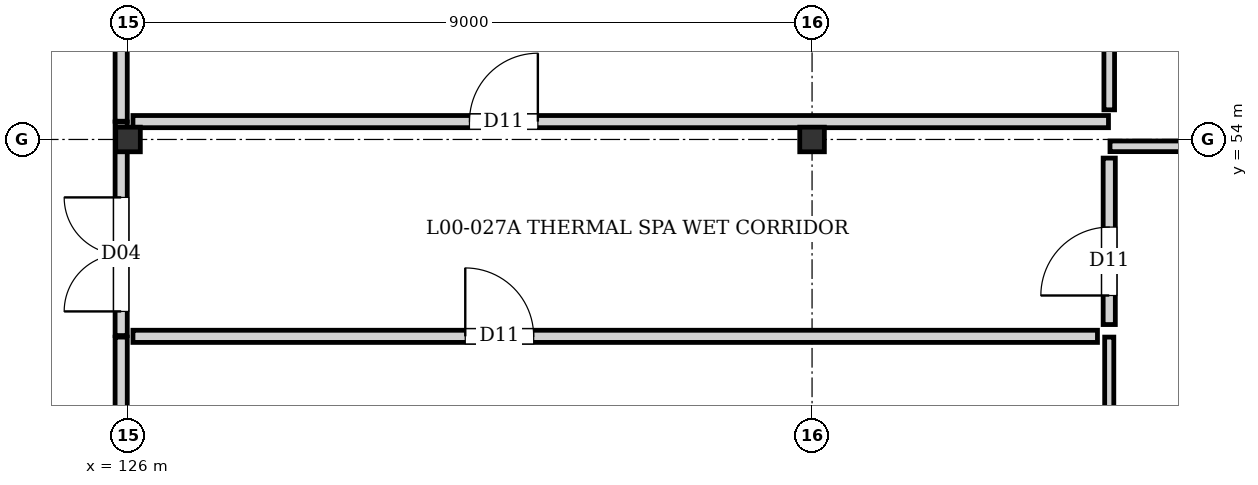
"""IFC4 building model, lengths in metres.
Left out: names, types, materials, properties, quantities, classifications, styles, units other than length and angle.
Written with IfcOpenShell. Run it as: python <this file> out.ifc"""

import sys

from ifc_helpers import new_model, si_unit, direction, frame, frame_2d, origin, origin_2d, place, context, subcontext, project, spatial, rectangle, hollow_circle, extrude, element, fill, save


model = new_model("IFC4")
c1 = context("Model", 3, precision=1e-05, world=origin(), true_north=direction((0.0, 1.0)))
c2 = subcontext(c1, "Body", "Model", "MODEL_VIEW")
j1 = project(units=[si_unit("LENGTHUNIT", "METRE"), si_unit("PLANEANGLEUNIT", "RADIAN")], contexts=[c1])
p1 = place(None, origin())
s1 = spatial("IfcSite", under=j1, at=p1, CompositionType="ELEMENT")
p2 = place(p1, origin())
s2 = spatial("IfcBuilding", under=s1, at=p2, CompositionType="ELEMENT")
p3 = place(p2, origin())
s3 = spatial("IfcBuildingStorey", under=s2, at=p3, CompositionType="ELEMENT", Elevation=0.0)
for number, where, z_axis, x_axis in (
    (1, (126.0, 54.0, 0.0), (0.0, 0.0, 1.0), (1.0, 0.0, 0.0)),
    (2, (135.0, 54.0, 0.0), (0.0, 0.0, 1.0), (1.0, 0.0, 0.0)),
):
    element("IfcColumn", number, at=place(p3, frame(where, z_axis=z_axis, x_axis=x_axis)), inside=s3, PredefinedType="COLUMN", context=c2, shape_type="SweptSolid", body=[
        extrude(hollow_circle(Radius=0.162, WallThickness=0.016, at=origin_2d()), origin(), (0.0, 0.0, 1.0), 4.32),
    ])
p4 = place(p3, frame((125.91, 45.27, 0.0), z_axis=(0.0, 0.0, 1.0), x_axis=(0.0, 1.0, 0.0)))
e3 = element("IfcWall", 3, at=p4, inside=s3, PredefinedType="PARTITIONING", context=c2, shape_type="SweptSolid", body=[
    extrude(rectangle(XDim=6.13, YDim=0.16, at=frame_2d((3.065, 0.0))), origin(), (0.0, 0.0, 1.0), 3.765),
])
p5 = place(p3, frame((125.91, 54.24, 0.0), z_axis=(0.0, 0.0, 1.0), x_axis=(0.0, 1.0, 0.0)))
e4 = element("IfcWall", 4, at=p5, inside=s3, PredefinedType="PARTITIONING", context=c2, shape_type="SweptSolid", body=[
    extrude(rectangle(XDim=3.34, YDim=0.16, at=frame_2d((1.67, 0.0))), origin(), (0.0, 0.0, 1.0), 3.725),
])
p6 = place(p3, frame((138.91, 45.27, 0.0), z_axis=(0.0, 0.0, 1.0), x_axis=(0.0, 1.0, 0.0)))
e5 = element("IfcWall", 5, at=p6, inside=s3, PredefinedType="PARTITIONING", context=c2, shape_type="SweptSolid", body=[
    extrude(rectangle(XDim=6.13, YDim=0.12, at=frame_2d((3.065, 0.0))), origin(), (0.0, 0.0, 1.0), 4.055),
])
p7 = place(p3, frame((138.92, 53.91, 0.0), z_axis=(0.0, 0.0, 1.0), x_axis=(1.0, 0.0, 0.0)))
e6 = element("IfcWall", 6, at=p7, inside=s3, PredefinedType="PLUMBINGWALL", context=c2, shape_type="SweptSolid", body=[
    extrude(rectangle(XDim=4.945, YDim=0.14, at=frame_2d((2.473, 0.0))), origin(), (0.0, 0.0, 1.0), 3.565),
])
p8 = place(p3, frame((125.91, 51.42, 0.0), z_axis=(0.0, 0.0, 1.0), x_axis=(0.0, 1.0, 0.0)))
e7 = element("IfcWall", 7, at=p8, inside=s3, PredefinedType="PARTITIONING", context=c2, shape_type="SweptSolid", body=[
    extrude(rectangle(XDim=2.81, YDim=0.16, at=frame_2d((1.405, 0.0))), origin(), (0.0, 0.0, 1.0), 3.765),
])
p9 = place(p8, frame((0.318, 0.0, 0.0)))
e8 = element("IfcOpeningElement", 8, at=p9, cuts=e7, PredefinedType="OPENING", context=c2, shape_type="SweptSolid", body=[
    extrude(rectangle(XDim=1.5, YDim=2.1, at=frame_2d((0.75, 1.05))), frame((0.0, 0.09, 0.0), z_axis=(0.0, -1.0, 0.0), x_axis=(1.0, 0.0, 0.0)), (0.0, 0.0, 1.0), 0.18),
])
p10 = place(p3, frame((126.065, 51.41, 0.0), z_axis=(0.0, 0.0, 1.0), x_axis=(1.0, 0.0, 0.0)))
e9 = element("IfcWall", 9, at=p10, inside=s3, PredefinedType="PARTITIONING", context=c2, shape_type="SweptSolid", body=[
    extrude(rectangle(XDim=12.69, YDim=0.16, at=frame_2d((6.345, 0.0))), origin(), (0.0, 0.0, 1.0), 4.055),
])
p11 = place(p10, frame((4.372, 0.0, 0.0)))
e10 = element("IfcOpeningElement", 10, at=p11, cuts=e9, PredefinedType="OPENING", context=c2, shape_type="SweptSolid", body=[
    extrude(rectangle(XDim=0.9, YDim=2.2, at=frame_2d((0.45, 1.1))), frame((0.0, 0.09, 0.0), z_axis=(0.0, -1.0, 0.0), x_axis=(1.0, 0.0, 0.0)), (0.0, 0.0, 1.0), 0.18),
])
p12 = place(p3, frame((126.065, 54.235, 0.0), z_axis=(0.0, 0.0, 1.0), x_axis=(1.0, 0.0, 0.0)))
e11 = element("IfcWall", 11, at=p12, inside=s3, PredefinedType="PARTITIONING", context=c2, shape_type="SweptSolid", body=[
    extrude(rectangle(XDim=12.835, YDim=0.16, at=frame_2d((6.417, 0.0))), origin(), (0.0, 0.0, 1.0), 4.055),
])
p13 = place(p12, frame((4.427, 0.0, 0.0)))
e12 = element("IfcOpeningElement", 12, at=p13, cuts=e11, PredefinedType="OPENING", context=c2, shape_type="SweptSolid", body=[
    extrude(rectangle(XDim=0.9, YDim=2.2, at=frame_2d((0.45, 1.1))), frame((0.0, 0.09, 0.0), z_axis=(0.0, -1.0, 0.0), x_axis=(1.0, 0.0, 0.0)), (0.0, 0.0, 1.0), 0.18),
])
p14 = place(p3, frame((138.91, 51.565, 0.0), z_axis=(0.0, 0.0, 1.0), x_axis=(0.0, 1.0, 0.0)))
e13 = element("IfcWall", 13, at=p14, inside=s3, PredefinedType="PARTITIONING", context=c2, shape_type="SweptSolid", body=[
    extrude(rectangle(XDim=2.19, YDim=0.16, at=frame_2d((1.095, 0.0))), origin(), (0.0, 0.0, 1.0), 4.055),
])
p15 = place(p14, frame((0.382, 0.0, 0.0)))
e14 = element("IfcOpeningElement", 14, at=p15, cuts=e13, PredefinedType="OPENING", context=c2, shape_type="SweptSolid", body=[
    extrude(rectangle(XDim=0.9, YDim=2.2, at=frame_2d((0.45, 1.1))), frame((0.0, 0.09, 0.0), z_axis=(0.0, -1.0, 0.0), x_axis=(1.0, 0.0, 0.0)), (0.0, 0.0, 1.0), 0.18),
])
p16 = place(p3, frame((138.91, 54.39, 0.0), z_axis=(0.0, 0.0, 1.0), x_axis=(0.0, 1.0, 0.0)))
e15 = element("IfcWall", 15, at=p16, inside=s3, PredefinedType="PLUMBINGWALL", context=c2, shape_type="SweptSolid", body=[
    extrude(rectangle(XDim=8.475, YDim=0.14, at=frame_2d((4.238, 0.0))), origin(), (0.0, 0.0, 1.0), 4.055),
])
p17 = place(p16, frame((3.788, 0.0, 0.0)))
e16 = element("IfcOpeningElement", 16, at=p17, cuts=e15, PredefinedType="OPENING", context=c2, shape_type="SweptSolid", body=[
    extrude(rectangle(XDim=0.9, YDim=2.1, at=frame_2d((0.45, 1.05))), frame((0.0, 0.08, 0.0), z_axis=(0.0, -1.0, 0.0), x_axis=(1.0, 0.0, 0.0)), (0.0, 0.0, 1.0), 0.16),
])
p18 = place(p9, origin())
e17 = element("IfcDoor", 17, at=p18, inside=s3, OperationType="DOUBLE_DOOR_SINGLE_SWING", PredefinedType="DOOR", context=c2, shape_type="SweptSolid", body=[
    extrude(rectangle(XDim=1.5, YDim=2.1, at=frame_2d((0.75, 1.05))), frame((0.0, 0.025, 0.0), z_axis=(0.0, -1.0, 0.0), x_axis=(1.0, 0.0, 0.0)), (0.0, 0.0, 1.0), 0.05),
])
fill(e8, e17)
p19 = place(p11, origin())
e18 = element("IfcDoor", 18, at=p19, inside=s3, OperationType="SINGLE_SWING_LEFT", PredefinedType="DOOR", context=c2, shape_type="SweptSolid", body=[
    extrude(rectangle(XDim=0.9, YDim=2.2, at=frame_2d((0.45, 1.1))), frame((0.0, 0.025, 0.0), z_axis=(0.0, -1.0, 0.0), x_axis=(1.0, 0.0, 0.0)), (0.0, 0.0, 1.0), 0.05),
])
fill(e10, e18)
p20 = place(p13, origin())
e19 = element("IfcDoor", 19, at=p20, inside=s3, OperationType="SINGLE_SWING_RIGHT", PredefinedType="DOOR", context=c2, shape_type="SweptSolid", body=[
    extrude(rectangle(XDim=0.9, YDim=2.2, at=frame_2d((0.45, 1.1))), frame((0.0, 0.025, 0.0), z_axis=(0.0, -1.0, 0.0), x_axis=(1.0, 0.0, 0.0)), (0.0, 0.0, 1.0), 0.05),
])
fill(e12, e19)
p21 = place(p15, origin())
e20 = element("IfcDoor", 20, at=p21, inside=s3, OperationType="SINGLE_SWING_LEFT", PredefinedType="DOOR", context=c2, shape_type="SweptSolid", body=[
    extrude(rectangle(XDim=0.9, YDim=2.2, at=frame_2d((0.45, 1.1))), frame((0.0, 0.025, 0.0), z_axis=(0.0, -1.0, 0.0), x_axis=(1.0, 0.0, 0.0)), (0.0, 0.0, 1.0), 0.05),
])
fill(e14, e20)
save(model, sys.argv[1])
